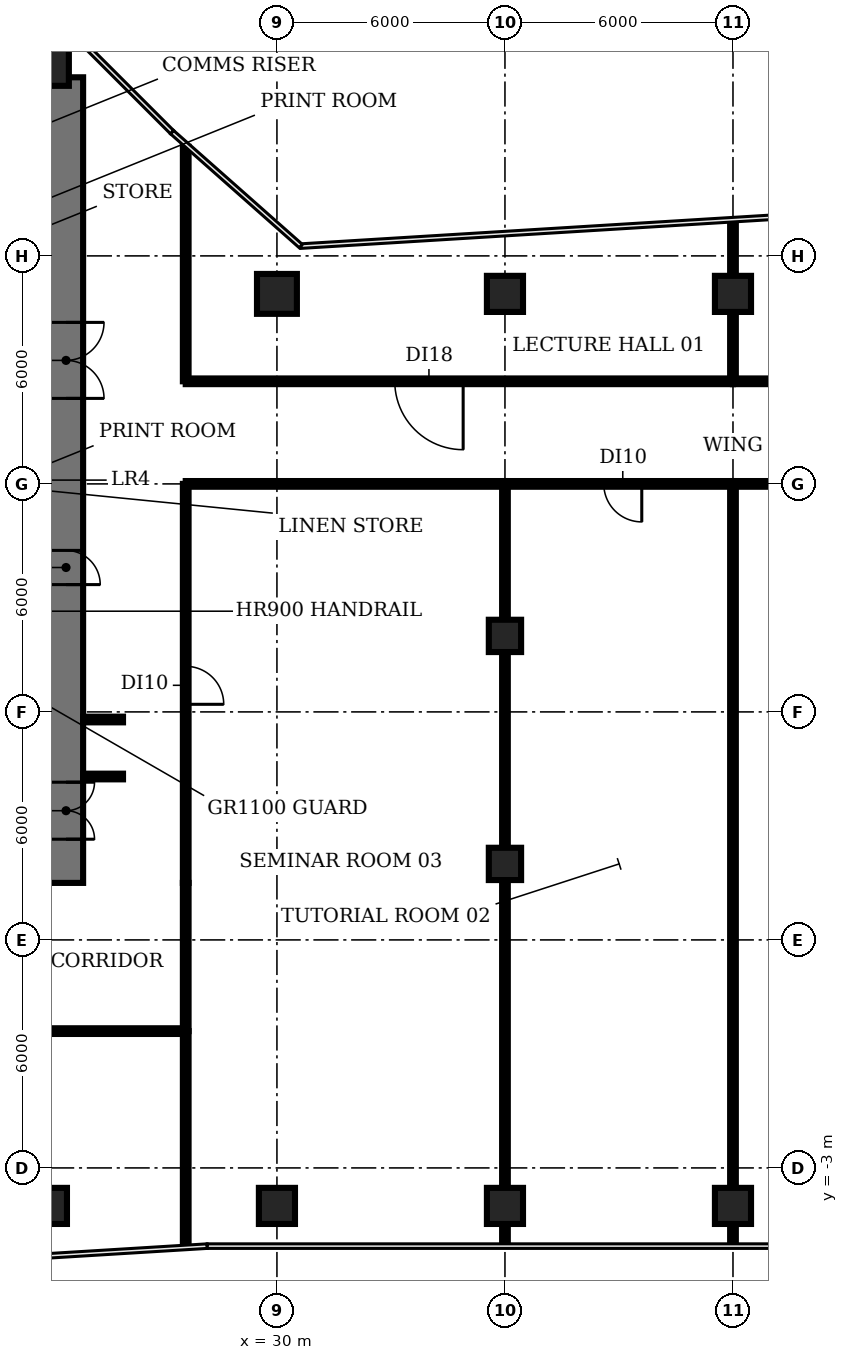
"""IFC4 building model, lengths in metres.
Left out: names, types, materials, properties, quantities, classifications, styles, units other than length and angle.
Written with IfcOpenShell. Run it as: python <this file> out.ifc"""

import sys

from ifc_helpers import new_model, si_unit, direction, frame, frame_2d, origin, origin_2d, place, context, subcontext, project, spatial, rectangle, circle, extrude, element, fill, save


model = new_model("IFC4")
c1 = context("Model", 3, precision=1e-05, world=origin(), true_north=direction((0.0, 1.0)))
c2 = subcontext(c1, "Body", "Model", "MODEL_VIEW")
j1 = project(units=[si_unit("LENGTHUNIT", "METRE"), si_unit("PLANEANGLEUNIT", "RADIAN")], contexts=[c1])
p1 = place(None, origin())
s1 = spatial("IfcSite", under=j1, at=p1, CompositionType="ELEMENT")
p2 = place(p1, origin())
s2 = spatial("IfcBuilding", under=s1, at=p2, CompositionType="ELEMENT")
p3 = place(p2, frame((0.0, 0.0, 66.8)))
s3 = spatial("IfcBuildingStorey", under=s2, at=p3, CompositionType="ELEMENT", Elevation=66.8)
p4 = place(p3, frame((24.0, -4.0, 0.0), z_axis=(0.0, 0.0, 1.0), x_axis=(1.0, 0.0, 0.0)))
e1 = element("IfcColumn", 1, at=p4, inside=s3, PredefinedType="COLUMN", context=c2, shape_type="SweptSolid", body=[
    extrude(rectangle(XDim=0.95, YDim=0.95, at=origin_2d()), origin(), (0.0, 0.0, 1.0), 3.85),
])
p5 = place(p3, frame((24.0, 26.0, 0.0), z_axis=(0.0, 0.0, 1.0), x_axis=(1.0, 0.0, 0.0)))
e2 = element("IfcColumn", 2, at=p5, inside=s3, PredefinedType="COLUMN", context=c2, shape_type="SweptSolid", body=[
    extrude(circle(Radius=0.525, at=origin_2d()), origin(), (0.0, 0.0, 1.0), 3.85),
])
p6 = place(p3, frame((30.0, -4.0, 0.0), z_axis=(0.0, 0.0, 1.0), x_axis=(1.0, 0.0, 0.0)))
e3 = element("IfcColumn", 3, at=p6, inside=s3, PredefinedType="COLUMN", context=c2, shape_type="SweptSolid", body=[
    extrude(rectangle(XDim=0.95, YDim=0.95, at=origin_2d()), origin(), (0.0, 0.0, 1.0), 3.85),
])
p7 = place(p3, frame((30.0, 20.0, 0.0), z_axis=(0.0, 0.0, 1.0), x_axis=(1.0, 0.0, 0.0)))
e4 = element("IfcColumn", 4, at=p7, inside=s3, PredefinedType="COLUMN", context=c2, shape_type="SweptSolid", body=[
    extrude(circle(Radius=0.525, at=origin_2d()), origin(), (0.0, 0.0, 1.0), 3.85),
])
p8 = place(p3, frame((36.0, -4.0, 0.0), z_axis=(0.0, 0.0, 1.0), x_axis=(1.0, 0.0, 0.0)))
e5 = element("IfcColumn", 5, at=p8, inside=s3, PredefinedType="COLUMN", context=c2, shape_type="SweptSolid", body=[
    extrude(rectangle(XDim=0.95, YDim=0.95, at=origin_2d()), origin(), (0.0, 0.0, 1.0), 3.85),
])
for number, where, z_axis, x_axis in (
    (6, (36.0, 5.0, 0.0), (0.0, 0.0, 1.0), (1.0, 0.0, 0.0)),
    (7, (36.0, 11.0, 0.0), (0.0, 0.0, 1.0), (1.0, 0.0, 0.0)),
):
    element("IfcColumn", number, at=place(p3, frame(where, z_axis=z_axis, x_axis=x_axis)), inside=s3, PredefinedType="COLUMN", context=c2, shape_type="SweptSolid", body=[
        extrude(rectangle(XDim=0.85, YDim=0.85, at=origin_2d()), origin(), (0.0, 0.0, 1.0), 3.85),
    ])
for number, where, z_axis, x_axis in (
    (8, (36.0, 20.0, 0.0), (0.0, 0.0, 1.0), (1.0, 0.0, 0.0)),
    (9, (42.0, -4.0, 0.0), (0.0, 0.0, 1.0), (1.0, 0.0, 0.0)),
    (10, (42.0, 20.0, 0.0), (0.0, 0.0, 1.0), (1.0, 0.0, 0.0)),
):
    element("IfcColumn", number, at=place(p3, frame(where, z_axis=z_axis, x_axis=x_axis)), inside=s3, PredefinedType="COLUMN", context=c2, shape_type="SweptSolid", body=[
        extrude(rectangle(XDim=0.95, YDim=0.95, at=origin_2d()), origin(), (0.0, 0.0, 1.0), 3.85),
    ])
p9 = place(p3, frame((24.45, 25.7, 0.0), z_axis=(0.0, 0.0, 1.0), x_axis=(0.0, -1.0, 0.0)))
e11 = element("IfcWall", 11, at=p9, inside=s3, PredefinedType="SHEAR", context=c2, shape_type="SweptSolid", body=[
    extrude(rectangle(XDim=21.2, YDim=0.9, at=frame_2d((10.6, 0.0))), origin(), (0.0, 0.0, 1.0), 3.85),
])
p10 = place(p9, frame((18.55, 0.0, 0.0)))
e12 = element("IfcOpeningElement", 12, at=p10, cuts=e11, PredefinedType="OPENING", context=c2, shape_type="SweptSolid", body=[
    extrude(rectangle(XDim=1.5, YDim=2.1, at=frame_2d((0.75, 1.05))), frame((0.0, 0.46, 0.0), z_axis=(0.0, -1.0, 0.0), x_axis=(1.0, 0.0, 0.0)), (0.0, 0.0, 1.0), 0.92),
])
p11 = place(p9, frame((12.45, 0.0, 0.0)))
e13 = element("IfcOpeningElement", 13, at=p11, cuts=e11, PredefinedType="OPENING", context=c2, shape_type="SweptSolid", body=[
    extrude(rectangle(XDim=0.9, YDim=2.1, at=frame_2d((0.45, 1.05))), frame((0.0, 0.46, 0.0), z_axis=(0.0, -1.0, 0.0), x_axis=(1.0, 0.0, 0.0)), (0.0, 0.0, 1.0), 0.92),
])
p12 = place(p9, frame((6.45, 0.0, 0.0)))
e14 = element("IfcOpeningElement", 14, at=p12, cuts=e11, PredefinedType="OPENING", context=c2, shape_type="SweptSolid", body=[
    extrude(rectangle(XDim=2.0, YDim=2.1, at=frame_2d((1.0, 1.05))), frame((0.0, 0.46, 0.0), z_axis=(0.0, -1.0, 0.0), x_axis=(1.0, 0.0, 0.0)), (0.0, 0.0, 1.0), 0.92),
])
for number, where, z_axis, x_axis in (
    (15, (24.9, 7.3, 0.0), (0.0, 0.0, 1.0), (1.0, 0.0, 0.0)),
    (16, (24.9, 8.8, 0.0), (0.0, 0.0, 1.0), (1.0, 0.0, 0.0)),
):
    element("IfcWall", number, at=place(p3, frame(where, z_axis=z_axis, x_axis=x_axis)), inside=s3, PredefinedType="PARTITIONING", context=c2, shape_type="SweptSolid", body=[
        extrude(rectangle(XDim=1.05, YDim=0.15, at=frame_2d((0.525, 0.0))), origin(), (0.0, 0.0, 1.0), 2.83),
    ])
p13 = place(p3, frame((27.6, -5.04, 0.0), z_axis=(0.0, 0.0, 1.0), x_axis=(0.0, 1.0, 0.0)))
e17 = element("IfcWall", 17, at=p13, inside=s3, PredefinedType="PARTITIONING", context=c2, shape_type="SweptSolid", body=[
    extrude(rectangle(XDim=5.64, YDim=0.15, at=frame_2d((2.82, 0.0))), origin(), (0.0, 0.0, 1.0), 2.83),
])
p14 = place(p3, frame((27.6, 0.6, 0.0), z_axis=(0.0, 0.0, 1.0), x_axis=(-1.0, 0.0, 0.0)))
e18 = element("IfcWall", 18, at=p14, inside=s3, PredefinedType="PARTITIONING", context=c2, shape_type="SweptSolid", body=[
    extrude(rectangle(XDim=25.2, YDim=0.15, at=frame_2d((12.6, 0.0))), origin(), (0.0, 0.0, 1.0), 2.83),
])
p15 = place(p14, frame((12.1, 0.0, 0.0)))
e19 = element("IfcOpeningElement", 19, at=p15, cuts=e18, PredefinedType="OPENING", context=c2, shape_type="SweptSolid", body=[
    extrude(rectangle(XDim=1.2, YDim=2.1, at=frame_2d((0.6, 1.05))), frame((0.0, 0.085, 0.0), z_axis=(0.0, -1.0, 0.0), x_axis=(1.0, 0.0, 0.0)), (0.0, 0.0, 1.0), 0.17),
])
p16 = place(p3, frame((27.6, 0.6, 0.0), z_axis=(0.0, 0.0, 1.0), x_axis=(0.0, 1.0, 0.0)))
e20 = element("IfcWall", 20, at=p16, inside=s3, PredefinedType="PARTITIONING", context=c2, shape_type="SweptSolid", body=[
    extrude(rectangle(XDim=3.9, YDim=0.15, at=frame_2d((1.95, 0.0))), origin(), (0.0, 0.0, 1.0), 2.83),
])
p17 = place(p3, frame((27.6, 15.0, 0.0), z_axis=(0.0, 0.0, 1.0), x_axis=(0.0, -1.0, 0.0)))
e21 = element("IfcWall", 21, at=p17, inside=s3, PredefinedType="PARTITIONING", context=c2, shape_type="SweptSolid", body=[
    extrude(rectangle(XDim=10.5, YDim=0.15, at=frame_2d((5.25, 0.0))), origin(), (0.0, 0.0, 1.0), 2.83),
])
p18 = place(p17, frame((4.8, 0.0, 0.0)))
e22 = element("IfcOpeningElement", 22, at=p18, cuts=e21, PredefinedType="OPENING", context=c2, shape_type="SweptSolid", body=[
    extrude(rectangle(XDim=1.0, YDim=2.1, at=frame_2d((0.5, 1.05))), frame((0.0, 0.085, 0.0), z_axis=(0.0, -1.0, 0.0), x_axis=(1.0, 0.0, 0.0)), (0.0, 0.0, 1.0), 0.17),
])
p19 = place(p3, frame((27.6, 15.0, 0.0), z_axis=(0.0, 0.0, 1.0), x_axis=(1.0, 0.0, 0.0)))
e23 = element("IfcWall", 23, at=p19, inside=s3, PredefinedType="PARTITIONING", context=c2, shape_type="SweptSolid", body=[
    extrude(rectangle(XDim=8.4, YDim=0.15, at=frame_2d((4.2, 0.0))), origin(), (0.0, 0.0, 1.0), 2.83),
])
p20 = place(p3, frame((27.6, 17.7, 0.0), z_axis=(0.0, 0.0, 1.0), x_axis=(0.0, 1.0, 0.0)))
e24 = element("IfcWall", 24, at=p20, inside=s3, PredefinedType="PARTITIONING", context=c2, shape_type="SweptSolid", body=[
    extrude(rectangle(XDim=6.17, YDim=0.15, at=frame_2d((3.085, 0.0))), origin(), (0.0, 0.0, 1.0), 2.83),
])
for number, where, z_axis, x_axis in (
    (25, (36.0, -5.01, 0.0), (0.0, 0.0, 1.0), (0.0, 1.0, 0.0)),
    (26, (42.0, -5.01, 0.0), (0.0, 0.0, 1.0), (0.0, 1.0, 0.0)),
):
    element("IfcWall", number, at=place(p3, frame(where, z_axis=z_axis, x_axis=x_axis)), inside=s3, PredefinedType="PARTITIONING", context=c2, shape_type="SweptSolid", body=[
        extrude(rectangle(XDim=20.01, YDim=0.15, at=frame_2d((10.005, 0.0))), origin(), (0.0, 0.0, 1.0), 2.83),
    ])
p21 = place(p3, frame((42.0, 15.0, 0.0), z_axis=(0.0, 0.0, 1.0), x_axis=(-1.0, 0.0, 0.0)))
e27 = element("IfcWall", 27, at=p21, inside=s3, PredefinedType="PARTITIONING", context=c2, shape_type="SweptSolid", body=[
    extrude(rectangle(XDim=6.0, YDim=0.15, at=frame_2d((3.0, 0.0))), origin(), (0.0, 0.0, 1.0), 2.83),
])
p22 = place(p21, frame((2.4, 0.0, 0.0)))
e28 = element("IfcOpeningElement", 28, at=p22, cuts=e27, PredefinedType="OPENING", context=c2, shape_type="SweptSolid", body=[
    extrude(rectangle(XDim=1.0, YDim=2.1, at=frame_2d((0.5, 1.05))), frame((0.0, 0.085, 0.0), z_axis=(0.0, -1.0, 0.0), x_axis=(1.0, 0.0, 0.0)), (0.0, 0.0, 1.0), 0.17),
])
p23 = place(p3, frame((42.0, 17.7, 0.0), z_axis=(0.0, 0.0, 1.0), x_axis=(-1.0, 0.0, 0.0)))
e29 = element("IfcWall", 29, at=p23, inside=s3, PredefinedType="PARTITIONING", context=c2, shape_type="SweptSolid", body=[
    extrude(rectangle(XDim=14.4, YDim=0.15, at=frame_2d((7.2, 0.0))), origin(), (0.0, 0.0, 1.0), 2.83),
])
p24 = place(p23, frame((7.1, 0.0, 0.0)))
e30 = element("IfcOpeningElement", 30, at=p24, cuts=e29, PredefinedType="OPENING", context=c2, shape_type="SweptSolid", body=[
    extrude(rectangle(XDim=1.8, YDim=2.1, at=frame_2d((0.9, 1.05))), frame((0.0, 0.085, 0.0), z_axis=(0.0, -1.0, 0.0), x_axis=(1.0, 0.0, 0.0)), (0.0, 0.0, 1.0), 0.17),
])
p25 = place(p3, frame((42.0, 17.7, 0.0), z_axis=(0.0, 0.0, 1.0), x_axis=(0.0, 1.0, 0.0)))
e31 = element("IfcWall", 31, at=p25, inside=s3, PredefinedType="PARTITIONING", context=c2, shape_type="SweptSolid", body=[
    extrude(rectangle(XDim=4.2, YDim=0.15, at=frame_2d((2.1, 0.0))), origin(), (0.0, 0.0, 1.0), 2.83),
])
p26 = place(p3, frame((42.0, 17.7, 0.0), z_axis=(0.0, 0.0, 1.0), x_axis=(1.0, 0.0, 0.0)))
e32 = element("IfcWall", 32, at=p26, inside=s3, PredefinedType="PARTITIONING", context=c2, shape_type="SweptSolid", body=[
    extrude(rectangle(XDim=6.0, YDim=0.15, at=frame_2d((3.0, 0.0))), origin(), (0.0, 0.0, 1.0), 2.83),
])
p27 = place(p26, frame((2.4, 0.0, 0.0)))
e33 = element("IfcOpeningElement", 33, at=p27, cuts=e32, PredefinedType="OPENING", context=c2, shape_type="SweptSolid", body=[
    extrude(rectangle(XDim=1.0, YDim=2.1, at=frame_2d((0.5, 1.05))), frame((0.0, 0.085, 0.0), z_axis=(0.0, -1.0, 0.0), x_axis=(1.0, 0.0, 0.0)), (0.0, 0.0, 1.0), 0.17),
])
p28 = place(p3, frame((54.0, 15.0, 0.0), z_axis=(0.0, 0.0, 1.0), x_axis=(-1.0, 0.0, 0.0)))
e34 = element("IfcWall", 34, at=p28, inside=s3, PredefinedType="PARTITIONING", context=c2, shape_type="SweptSolid", body=[
    extrude(rectangle(XDim=12.0, YDim=0.15, at=frame_2d((6.0, 0.0))), origin(), (0.0, 0.0, 1.0), 2.83),
])
p29 = place(p28, frame((5.5, 0.0, 0.0)))
e35 = element("IfcOpeningElement", 35, at=p29, cuts=e34, PredefinedType="OPENING", context=c2, shape_type="SweptSolid", body=[
    extrude(rectangle(XDim=1.2, YDim=2.1, at=frame_2d((0.6, 1.05))), frame((0.0, 0.085, 0.0), z_axis=(0.0, -1.0, 0.0), x_axis=(1.0, 0.0, 0.0)), (0.0, 0.0, 1.0), 0.17),
])
p30 = place(p10, origin())
e36 = element("IfcDoor", 36, at=p30, inside=s3, OperationType="DOUBLE_DOOR_SINGLE_SWING", PredefinedType="DOOR", context=c2, shape_type="SweptSolid", body=[
    extrude(rectangle(XDim=1.5, YDim=2.1, at=frame_2d((0.75, 1.05))), frame((0.0, 0.025, 0.0), z_axis=(0.0, -1.0, 0.0), x_axis=(1.0, 0.0, 0.0)), (0.0, 0.0, 1.0), 0.05),
])
fill(e12, e36)
p31 = place(p12, origin())
e37 = element("IfcDoor", 37, at=p31, inside=s3, OperationType="DOUBLE_DOOR_SINGLE_SWING", PredefinedType="DOOR", context=c2, shape_type="SweptSolid", body=[
    extrude(rectangle(XDim=2.0, YDim=2.1, at=frame_2d((1.0, 1.05))), frame((0.0, 0.025, 0.0), z_axis=(0.0, -1.0, 0.0), x_axis=(1.0, 0.0, 0.0)), (0.0, 0.0, 1.0), 0.05),
])
fill(e14, e37)
p32 = place(p18, origin())
e38 = element("IfcDoor", 38, at=p32, inside=s3, OperationType="SINGLE_SWING_RIGHT", PredefinedType="DOOR", context=c2, shape_type="SweptSolid", body=[
    extrude(rectangle(XDim=1.0, YDim=2.1, at=frame_2d((0.5, 1.05))), frame((0.0, 0.025, 0.0), z_axis=(0.0, -1.0, 0.0), x_axis=(1.0, 0.0, 0.0)), (0.0, 0.0, 1.0), 0.05),
])
fill(e22, e38)
p33 = place(p22, origin())
e39 = element("IfcDoor", 39, at=p33, inside=s3, OperationType="SINGLE_SWING_LEFT", PredefinedType="DOOR", context=c2, shape_type="SweptSolid", body=[
    extrude(rectangle(XDim=1.0, YDim=2.1, at=frame_2d((0.5, 1.05))), frame((0.0, 0.025, 0.0), z_axis=(0.0, -1.0, 0.0), x_axis=(1.0, 0.0, 0.0)), (0.0, 0.0, 1.0), 0.05),
])
fill(e28, e39)
p34 = place(p24, origin())
e40 = element("IfcDoor", 40, at=p34, inside=s3, OperationType="SINGLE_SWING_LEFT", PredefinedType="DOOR", context=c2, shape_type="SweptSolid", body=[
    extrude(rectangle(XDim=1.8, YDim=2.1, at=frame_2d((0.9, 1.05))), frame((0.0, 0.025, 0.0), z_axis=(0.0, -1.0, 0.0), x_axis=(1.0, 0.0, 0.0)), (0.0, 0.0, 1.0), 0.05),
])
fill(e30, e40)
save(model, sys.argv[1])
